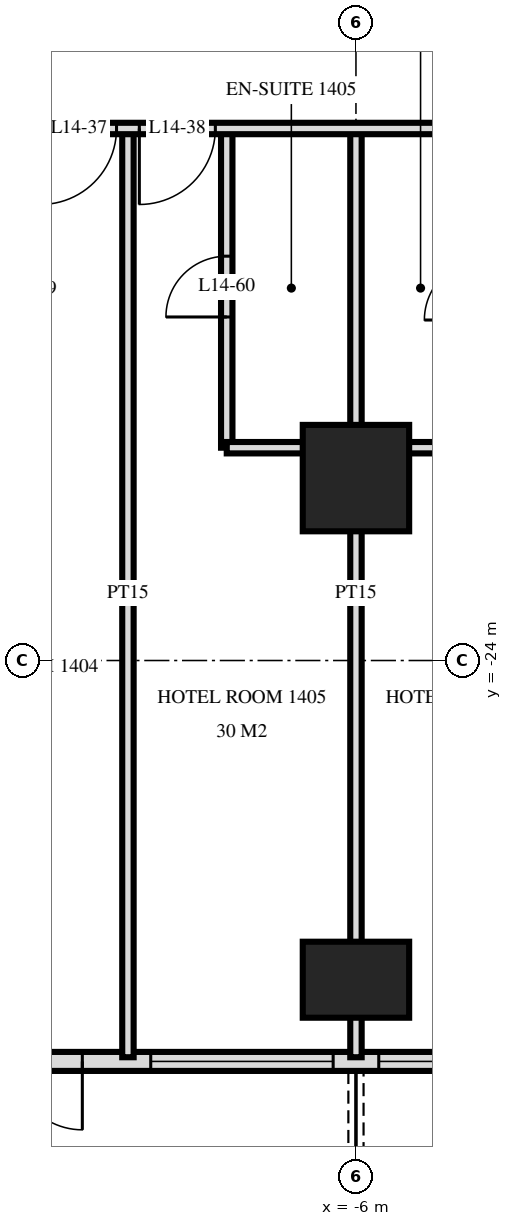
"""IFC4 building model, lengths in metres.
Left out: names, types, materials, properties, quantities, classifications, styles, units other than length and angle.
Written with IfcOpenShell. Run it as: python <this file> out.ifc"""

import sys

from ifc_helpers import new_model, si_unit, direction, frame, frame_2d, origin, origin_2d, place, context, subcontext, project, spatial, rectangle, extrude, element, fill, save


model = new_model("IFC4")
c1 = context("Model", 3, precision=1e-05, world=origin(), true_north=direction((0.0, 1.0)))
c2 = subcontext(c1, "Body", "Model", "MODEL_VIEW")
j1 = project(units=[si_unit("LENGTHUNIT", "METRE"), si_unit("PLANEANGLEUNIT", "RADIAN")], contexts=[c1])
p1 = place(None, origin())
s1 = spatial("IfcSite", under=j1, at=p1, CompositionType="ELEMENT")
p2 = place(p1, origin())
s2 = spatial("IfcBuilding", under=s1, at=p2, CompositionType="ELEMENT")
p3 = place(p2, frame((0.0, 0.0, 60.0)))
s3 = spatial("IfcBuildingStorey", under=s2, at=p3, CompositionType="ELEMENT", Elevation=60.0)
p4 = place(p3, frame((-6.0, -28.2, 0.0), z_axis=(0.0, 0.0, 1.0), x_axis=(1.0, 0.0, 0.0)))
e1 = element("IfcColumn", 1, at=p4, inside=s3, PredefinedType="COLUMN", context=c2, shape_type="SweptSolid", body=[
    extrude(rectangle(XDim=1.4, YDim=1.0, at=origin_2d()), origin(), (0.0, 0.0, 1.0), 3.6),
])
p5 = place(p3, frame((-6.0, -21.6, 0.0), z_axis=(0.0, 0.0, 1.0), x_axis=(1.0, 0.0, 0.0)))
e2 = element("IfcColumn", 2, at=p5, inside=s3, PredefinedType="COLUMN", context=c2, shape_type="SweptSolid", body=[
    extrude(rectangle(XDim=1.4, YDim=1.4, at=origin_2d()), origin(), (0.0, 0.0, 1.0), 3.6),
])
p6 = place(p3, frame((-28.775, -29.275, 0.0), z_axis=(0.0, 0.0, 1.0), x_axis=(1.0, 0.0, 0.0)))
e3 = element("IfcWall", 3, at=p6, inside=s3, PredefinedType="SOLIDWALL", context=c2, shape_type="SweptSolid", body=[
    extrude(rectangle(XDim=57.551, YDim=0.25, at=frame_2d((28.775, 0.0))), origin(), (0.0, 0.0, 1.0), 3.32),
])
p7 = place(p6, frame((0.575, 0.0, 0.0)))
e4 = element("IfcOpeningElement", 4, at=p7, cuts=e3, PredefinedType="OPENING", context=c2, shape_type="SweptSolid", body=[
    extrude(rectangle(XDim=1.8, YDim=2.4, at=frame_2d((0.9, 1.2))), frame((0.0, 0.135, 0.0), z_axis=(0.0, -1.0, 0.0), x_axis=(1.0, 0.0, 0.0)), (0.0, 0.0, 1.0), 0.27),
])
p8 = place(p6, frame((5.375, 0.0, 0.0)))
e5 = element("IfcOpeningElement", 5, at=p8, cuts=e3, PredefinedType="OPENING", context=c2, shape_type="SweptSolid", body=[
    extrude(rectangle(XDim=1.8, YDim=2.4, at=frame_2d((0.9, 1.2))), frame((0.0, 0.135, 0.0), z_axis=(0.0, -1.0, 0.0), x_axis=(1.0, 0.0, 0.0)), (0.0, 0.0, 1.0), 0.27),
])
p9 = place(p6, frame((8.075, 0.0, 0.3)))
e6 = element("IfcOpeningElement", 6, at=p9, cuts=e3, PredefinedType="OPENING", context=c2, shape_type="SweptSolid", body=[
    extrude(rectangle(XDim=2.4, YDim=2.1, at=frame_2d((1.2, 1.05))), frame((0.0, 0.135, 0.0), z_axis=(0.0, -1.0, 0.0), x_axis=(1.0, 0.0, 0.0)), (0.0, 0.0, 1.0), 0.27),
])
p10 = place(p6, frame((11.375, 0.0, 0.0)))
e7 = element("IfcOpeningElement", 7, at=p10, cuts=e3, PredefinedType="OPENING", context=c2, shape_type="SweptSolid", body=[
    extrude(rectangle(XDim=1.8, YDim=2.4, at=frame_2d((0.9, 1.2))), frame((0.0, 0.135, 0.0), z_axis=(0.0, -1.0, 0.0), x_axis=(1.0, 0.0, 0.0)), (0.0, 0.0, 1.0), 0.27),
])
p11 = place(p6, frame((14.075, 0.0, 0.3)))
e8 = element("IfcOpeningElement", 8, at=p11, cuts=e3, PredefinedType="OPENING", context=c2, shape_type="SweptSolid", body=[
    extrude(rectangle(XDim=2.4, YDim=2.1, at=frame_2d((1.2, 1.05))), frame((0.0, 0.135, 0.0), z_axis=(0.0, -1.0, 0.0), x_axis=(1.0, 0.0, 0.0)), (0.0, 0.0, 1.0), 0.27),
])
p12 = place(p6, frame((17.375, 0.0, 0.0)))
e9 = element("IfcOpeningElement", 9, at=p12, cuts=e3, PredefinedType="OPENING", context=c2, shape_type="SweptSolid", body=[
    extrude(rectangle(XDim=1.8, YDim=2.4, at=frame_2d((0.9, 1.2))), frame((0.0, 0.135, 0.0), z_axis=(0.0, -1.0, 0.0), x_axis=(1.0, 0.0, 0.0)), (0.0, 0.0, 1.0), 0.27),
])
p13 = place(p6, frame((20.075, 0.0, 0.3)))
e10 = element("IfcOpeningElement", 10, at=p13, cuts=e3, PredefinedType="OPENING", context=c2, shape_type="SweptSolid", body=[
    extrude(rectangle(XDim=2.4, YDim=2.1, at=frame_2d((1.2, 1.05))), frame((0.0, 0.135, 0.0), z_axis=(0.0, -1.0, 0.0), x_axis=(1.0, 0.0, 0.0)), (0.0, 0.0, 1.0), 0.27),
])
p14 = place(p6, frame((23.075, 0.0, 0.3)))
e11 = element("IfcOpeningElement", 11, at=p14, cuts=e3, PredefinedType="OPENING", context=c2, shape_type="SweptSolid", body=[
    extrude(rectangle(XDim=2.4, YDim=2.1, at=frame_2d((1.2, 1.05))), frame((0.0, 0.135, 0.0), z_axis=(0.0, -1.0, 0.0), x_axis=(1.0, 0.0, 0.0)), (0.0, 0.0, 1.0), 0.27),
])
p15 = place(p6, frame((26.375, 0.0, 0.0)))
e12 = element("IfcOpeningElement", 12, at=p15, cuts=e3, PredefinedType="OPENING", context=c2, shape_type="SweptSolid", body=[
    extrude(rectangle(XDim=1.8, YDim=2.4, at=frame_2d((0.9, 1.2))), frame((0.0, 0.135, 0.0), z_axis=(0.0, -1.0, 0.0), x_axis=(1.0, 0.0, 0.0)), (0.0, 0.0, 1.0), 0.27),
])
p16 = place(p6, frame((29.075, 0.0, 0.3)))
e13 = element("IfcOpeningElement", 13, at=p16, cuts=e3, PredefinedType="OPENING", context=c2, shape_type="SweptSolid", body=[
    extrude(rectangle(XDim=2.4, YDim=2.1, at=frame_2d((1.2, 1.05))), frame((0.0, 0.135, 0.0), z_axis=(0.0, -1.0, 0.0), x_axis=(1.0, 0.0, 0.0)), (0.0, 0.0, 1.0), 0.27),
])
p17 = place(p6, frame((32.375, 0.0, 0.0)))
e14 = element("IfcOpeningElement", 14, at=p17, cuts=e3, PredefinedType="OPENING", context=c2, shape_type="SweptSolid", body=[
    extrude(rectangle(XDim=1.8, YDim=2.4, at=frame_2d((0.9, 1.2))), frame((0.0, 0.135, 0.0), z_axis=(0.0, -1.0, 0.0), x_axis=(1.0, 0.0, 0.0)), (0.0, 0.0, 1.0), 0.27),
])
p18 = place(p6, frame((35.375, 0.0, 0.0)))
e15 = element("IfcOpeningElement", 15, at=p18, cuts=e3, PredefinedType="OPENING", context=c2, shape_type="SweptSolid", body=[
    extrude(rectangle(XDim=1.8, YDim=2.4, at=frame_2d((0.9, 1.2))), frame((0.0, 0.135, 0.0), z_axis=(0.0, -1.0, 0.0), x_axis=(1.0, 0.0, 0.0)), (0.0, 0.0, 1.0), 0.27),
])
p19 = place(p6, frame((38.075, 0.0, 0.3)))
e16 = element("IfcOpeningElement", 16, at=p19, cuts=e3, PredefinedType="OPENING", context=c2, shape_type="SweptSolid", body=[
    extrude(rectangle(XDim=2.4, YDim=2.1, at=frame_2d((1.2, 1.05))), frame((0.0, 0.135, 0.0), z_axis=(0.0, -1.0, 0.0), x_axis=(1.0, 0.0, 0.0)), (0.0, 0.0, 1.0), 0.27),
])
p20 = place(p6, frame((41.375, 0.0, 0.0)))
e17 = element("IfcOpeningElement", 17, at=p20, cuts=e3, PredefinedType="OPENING", context=c2, shape_type="SweptSolid", body=[
    extrude(rectangle(XDim=1.8, YDim=2.4, at=frame_2d((0.9, 1.2))), frame((0.0, 0.135, 0.0), z_axis=(0.0, -1.0, 0.0), x_axis=(1.0, 0.0, 0.0)), (0.0, 0.0, 1.0), 0.27),
])
p21 = place(p6, frame((44.075, 0.0, 0.3)))
e18 = element("IfcOpeningElement", 18, at=p21, cuts=e3, PredefinedType="OPENING", context=c2, shape_type="SweptSolid", body=[
    extrude(rectangle(XDim=2.4, YDim=2.1, at=frame_2d((1.2, 1.05))), frame((0.0, 0.135, 0.0), z_axis=(0.0, -1.0, 0.0), x_axis=(1.0, 0.0, 0.0)), (0.0, 0.0, 1.0), 0.27),
])
p22 = place(p6, frame((47.075, 0.0, 0.3)))
e19 = element("IfcOpeningElement", 19, at=p22, cuts=e3, PredefinedType="OPENING", context=c2, shape_type="SweptSolid", body=[
    extrude(rectangle(XDim=2.4, YDim=2.1, at=frame_2d((1.2, 1.05))), frame((0.0, 0.135, 0.0), z_axis=(0.0, -1.0, 0.0), x_axis=(1.0, 0.0, 0.0)), (0.0, 0.0, 1.0), 0.27),
])
p23 = place(p6, frame((50.375, 0.0, 0.0)))
e20 = element("IfcOpeningElement", 20, at=p23, cuts=e3, PredefinedType="OPENING", context=c2, shape_type="SweptSolid", body=[
    extrude(rectangle(XDim=1.8, YDim=2.4, at=frame_2d((0.9, 1.2))), frame((0.0, 0.135, 0.0), z_axis=(0.0, -1.0, 0.0), x_axis=(1.0, 0.0, 0.0)), (0.0, 0.0, 1.0), 0.27),
])
p24 = place(p6, frame((53.375, 0.0, 0.0)))
e21 = element("IfcOpeningElement", 21, at=p24, cuts=e3, PredefinedType="OPENING", context=c2, shape_type="SweptSolid", body=[
    extrude(rectangle(XDim=1.8, YDim=2.4, at=frame_2d((0.9, 1.2))), frame((0.0, 0.135, 0.0), z_axis=(0.0, -1.0, 0.0), x_axis=(1.0, 0.0, 0.0)), (0.0, 0.0, 1.0), 0.27),
])
p25 = place(p3, frame((-6.0, -29.22, 0.0), z_axis=(0.0, 0.0, 1.0), x_axis=(0.0, 1.0, 0.0)))
e22 = element("IfcWall", 22, at=p25, inside=s3, PredefinedType="PARTITIONING", context=c2, shape_type="SweptSolid", body=[
    extrude(rectangle(XDim=12.22, YDim=0.15, at=frame_2d((6.11, 0.0))), origin(), (0.0, 0.0, 1.0), 3.32),
])
p26 = place(p3, frame((-7.7, -21.2, 0.0), z_axis=(0.0, 0.0, 1.0), x_axis=(0.0, 1.0, 0.0)))
e23 = element("IfcWall", 23, at=p26, inside=s3, PredefinedType="PARTITIONING", context=c2, shape_type="SweptSolid", body=[
    extrude(rectangle(XDim=4.2, YDim=0.15, at=frame_2d((2.1, 0.0))), origin(), (0.0, 0.0, 1.0), 3.32),
])
p27 = place(p26, frame((1.72, 0.0, 0.0)))
e24 = element("IfcOpeningElement", 24, at=p27, cuts=e23, PredefinedType="OPENING", context=c2, shape_type="SweptSolid", body=[
    extrude(rectangle(XDim=0.8, YDim=2.1, at=frame_2d((0.4, 1.05))), frame((0.0, 0.085, 0.0), z_axis=(0.0, -1.0, 0.0), x_axis=(1.0, 0.0, 0.0)), (0.0, 0.0, 1.0), 0.17),
])
p28 = place(p3, frame((-9.0, -29.22, 0.0), z_axis=(0.0, 0.0, 1.0), x_axis=(0.0, 1.0, 0.0)))
e25 = element("IfcWall", 25, at=p28, inside=s3, PredefinedType="PARTITIONING", context=c2, shape_type="SweptSolid", body=[
    extrude(rectangle(XDim=12.22, YDim=0.15, at=frame_2d((6.11, 0.0))), origin(), (0.0, 0.0, 1.0), 3.32),
])
p29 = place(p3, frame((-7.7, -21.2, 0.0), z_axis=(0.0, 0.0, 1.0), x_axis=(1.0, 0.0, 0.0)))
e26 = element("IfcWall", 26, at=p29, inside=s3, PredefinedType="PARTITIONING", context=c2, shape_type="SweptSolid", body=[
    extrude(rectangle(XDim=3.4, YDim=0.15, at=frame_2d((1.7, 0.0))), origin(), (0.0, 0.0, 1.0), 3.32),
])
p30 = place(p3, frame((-33.12, -17.0, 0.0), z_axis=(0.0, 0.0, 1.0), x_axis=(1.0, 0.0, 0.0)))
e27 = element("IfcWall", 27, at=p30, inside=s3, PredefinedType="PARTITIONING", context=c2, shape_type="SweptSolid", body=[
    extrude(rectangle(XDim=66.24, YDim=0.15, at=frame_2d((33.12, 0.0))), origin(), (0.0, 0.0, 1.0), 3.32),
])
p31 = place(p30, frame((12.27, 0.0, 0.0)))
e28 = element("IfcOpeningElement", 28, at=p31, cuts=e27, PredefinedType="OPENING", context=c2, shape_type="SweptSolid", body=[
    extrude(rectangle(XDim=1.0, YDim=2.1, at=frame_2d((0.5, 1.05))), frame((0.0, 0.085, 0.0), z_axis=(0.0, -1.0, 0.0), x_axis=(1.0, 0.0, 0.0)), (0.0, 0.0, 1.0), 0.17),
])
p32 = place(p30, frame((16.97, 0.0, 0.0)))
e29 = element("IfcOpeningElement", 29, at=p32, cuts=e27, PredefinedType="OPENING", context=c2, shape_type="SweptSolid", body=[
    extrude(rectangle(XDim=1.0, YDim=2.1, at=frame_2d((0.5, 1.05))), frame((0.0, 0.085, 0.0), z_axis=(0.0, -1.0, 0.0), x_axis=(1.0, 0.0, 0.0)), (0.0, 0.0, 1.0), 0.17),
])
p33 = place(p30, frame((18.27, 0.0, 0.0)))
e30 = element("IfcOpeningElement", 30, at=p33, cuts=e27, PredefinedType="OPENING", context=c2, shape_type="SweptSolid", body=[
    extrude(rectangle(XDim=1.0, YDim=2.1, at=frame_2d((0.5, 1.05))), frame((0.0, 0.085, 0.0), z_axis=(0.0, -1.0, 0.0), x_axis=(1.0, 0.0, 0.0)), (0.0, 0.0, 1.0), 0.17),
])
p34 = place(p30, frame((22.97, 0.0, 0.0)))
e31 = element("IfcOpeningElement", 31, at=p34, cuts=e27, PredefinedType="OPENING", context=c2, shape_type="SweptSolid", body=[
    extrude(rectangle(XDim=1.0, YDim=2.1, at=frame_2d((0.5, 1.05))), frame((0.0, 0.085, 0.0), z_axis=(0.0, -1.0, 0.0), x_axis=(1.0, 0.0, 0.0)), (0.0, 0.0, 1.0), 0.17),
])
p35 = place(p30, frame((24.27, 0.0, 0.0)))
e32 = element("IfcOpeningElement", 32, at=p35, cuts=e27, PredefinedType="OPENING", context=c2, shape_type="SweptSolid", body=[
    extrude(rectangle(XDim=1.0, YDim=2.1, at=frame_2d((0.5, 1.05))), frame((0.0, 0.085, 0.0), z_axis=(0.0, -1.0, 0.0), x_axis=(1.0, 0.0, 0.0)), (0.0, 0.0, 1.0), 0.17),
])
p36 = place(p30, frame((28.97, 0.0, 0.0)))
e33 = element("IfcOpeningElement", 33, at=p36, cuts=e27, PredefinedType="OPENING", context=c2, shape_type="SweptSolid", body=[
    extrude(rectangle(XDim=1.0, YDim=2.1, at=frame_2d((0.5, 1.05))), frame((0.0, 0.085, 0.0), z_axis=(0.0, -1.0, 0.0), x_axis=(1.0, 0.0, 0.0)), (0.0, 0.0, 1.0), 0.17),
])
p37 = place(p30, frame((30.27, 0.0, 0.0)))
e34 = element("IfcOpeningElement", 34, at=p37, cuts=e27, PredefinedType="OPENING", context=c2, shape_type="SweptSolid", body=[
    extrude(rectangle(XDim=1.0, YDim=2.1, at=frame_2d((0.5, 1.05))), frame((0.0, 0.085, 0.0), z_axis=(0.0, -1.0, 0.0), x_axis=(1.0, 0.0, 0.0)), (0.0, 0.0, 1.0), 0.17),
])
p38 = place(p30, frame((33.82, 0.0, 0.0)))
e35 = element("IfcOpeningElement", 35, at=p38, cuts=e27, PredefinedType="OPENING", context=c2, shape_type="SweptSolid", body=[
    extrude(rectangle(XDim=1.0, YDim=2.1, at=frame_2d((0.5, 1.05))), frame((0.0, 0.085, 0.0), z_axis=(0.0, -1.0, 0.0), x_axis=(1.0, 0.0, 0.0)), (0.0, 0.0, 1.0), 0.17),
])
p39 = place(p30, frame((46.27, 0.0, 0.0)))
e36 = element("IfcOpeningElement", 36, at=p39, cuts=e27, PredefinedType="OPENING", context=c2, shape_type="SweptSolid", body=[
    extrude(rectangle(XDim=1.0, YDim=2.1, at=frame_2d((0.5, 1.05))), frame((0.0, 0.085, 0.0), z_axis=(0.0, -1.0, 0.0), x_axis=(1.0, 0.0, 0.0)), (0.0, 0.0, 1.0), 0.17),
])
p40 = place(p30, frame((52.97, 0.0, 0.0)))
e37 = element("IfcOpeningElement", 37, at=p40, cuts=e27, PredefinedType="OPENING", context=c2, shape_type="SweptSolid", body=[
    extrude(rectangle(XDim=1.0, YDim=2.1, at=frame_2d((0.5, 1.05))), frame((0.0, 0.085, 0.0), z_axis=(0.0, -1.0, 0.0), x_axis=(1.0, 0.0, 0.0)), (0.0, 0.0, 1.0), 0.17),
])
p41 = place(p30, frame((6.05, 0.0, 0.0)))
e38 = element("IfcOpeningElement", 38, at=p41, cuts=e27, PredefinedType="OPENING", context=c2, shape_type="SweptSolid", body=[
    extrude(rectangle(XDim=1.0, YDim=2.1, at=frame_2d((0.5, 1.05))), frame((0.0, 0.085, 0.0), z_axis=(0.0, -1.0, 0.0), x_axis=(1.0, 0.0, 0.0)), (0.0, 0.0, 1.0), 0.17),
])
p42 = place(p30, frame((59.15, 0.0, 0.0)))
e39 = element("IfcOpeningElement", 39, at=p42, cuts=e27, PredefinedType="OPENING", context=c2, shape_type="SweptSolid", body=[
    extrude(rectangle(XDim=1.0, YDim=2.1, at=frame_2d((0.5, 1.05))), frame((0.0, 0.085, 0.0), z_axis=(0.0, -1.0, 0.0), x_axis=(1.0, 0.0, 0.0)), (0.0, 0.0, 1.0), 0.17),
])
p43 = place(p12, frame((0.9, 0.0, 0.0), z_axis=(0.0, 0.0, 1.0), x_axis=(-1.0, 0.0, 0.0)))
e40 = element("IfcDoor", 40, at=p43, inside=s3, OperationType="DOUBLE_DOOR_SINGLE_SWING", PredefinedType="DOOR", context=c2, shape_type="SweptSolid", body=[
    extrude(rectangle(XDim=1.8, YDim=2.4, at=frame_2d((0.0, 1.2))), frame((0.0, -0.025, 0.0), z_axis=(0.0, 1.0, 0.0), x_axis=(-1.0, 0.0, 0.0)), (0.0, 0.0, 1.0), 0.05),
])
fill(e9, e40)
p44 = place(p13, origin())
e41 = element("IfcWindow", 41, at=p44, inside=s3, PartitioningType="SINGLE_PANEL", PredefinedType="WINDOW", context=c2, shape_type="SweptSolid", body=[
    extrude(rectangle(XDim=2.4, YDim=2.1, at=frame_2d((1.2, 1.05))), frame((0.0, 0.03, 0.0), z_axis=(0.0, -1.0, 0.0), x_axis=(1.0, 0.0, 0.0)), (0.0, 0.0, 1.0), 0.06),
])
fill(e10, e41)
p45 = place(p14, origin())
e42 = element("IfcWindow", 42, at=p45, inside=s3, PartitioningType="SINGLE_PANEL", PredefinedType="WINDOW", context=c2, shape_type="SweptSolid", body=[
    extrude(rectangle(XDim=2.4, YDim=2.1, at=frame_2d((1.2, 1.05))), frame((0.0, 0.03, 0.0), z_axis=(0.0, -1.0, 0.0), x_axis=(1.0, 0.0, 0.0)), (0.0, 0.0, 1.0), 0.06),
])
fill(e11, e42)
p46 = place(p34, frame((0.5, 0.0, 0.0), z_axis=(0.0, 0.0, 1.0), x_axis=(-1.0, 0.0, 0.0)))
e43 = element("IfcDoor", 43, at=p46, inside=s3, OperationType="SINGLE_SWING_LEFT", PredefinedType="DOOR", context=c2, shape_type="SweptSolid", body=[
    extrude(rectangle(XDim=1.0, YDim=2.1, at=frame_2d((0.0, 1.05))), frame((0.0, -0.025, 0.0), z_axis=(0.0, 1.0, 0.0), x_axis=(-1.0, 0.0, 0.0)), (0.0, 0.0, 1.0), 0.05),
])
fill(e31, e43)
p47 = place(p35, frame((0.5, 0.0, 0.0), z_axis=(0.0, 0.0, 1.0), x_axis=(-1.0, 0.0, 0.0)))
e44 = element("IfcDoor", 44, at=p47, inside=s3, OperationType="SINGLE_SWING_LEFT", PredefinedType="DOOR", context=c2, shape_type="SweptSolid", body=[
    extrude(rectangle(XDim=1.0, YDim=2.1, at=frame_2d((0.0, 1.05))), frame((0.0, -0.025, 0.0), z_axis=(0.0, 1.0, 0.0), x_axis=(-1.0, 0.0, 0.0)), (0.0, 0.0, 1.0), 0.05),
])
fill(e32, e44)
p48 = place(p27, origin())
e45 = element("IfcDoor", 45, at=p48, inside=s3, OperationType="SINGLE_SWING_RIGHT", PredefinedType="DOOR", context=c2, shape_type="SweptSolid", body=[
    extrude(rectangle(XDim=0.8, YDim=2.1, at=frame_2d((0.4, 1.05))), frame((0.0, 0.025, 0.0), z_axis=(0.0, -1.0, 0.0), x_axis=(1.0, 0.0, 0.0)), (0.0, 0.0, 1.0), 0.05),
])
fill(e24, e45)
save(model, sys.argv[1])
